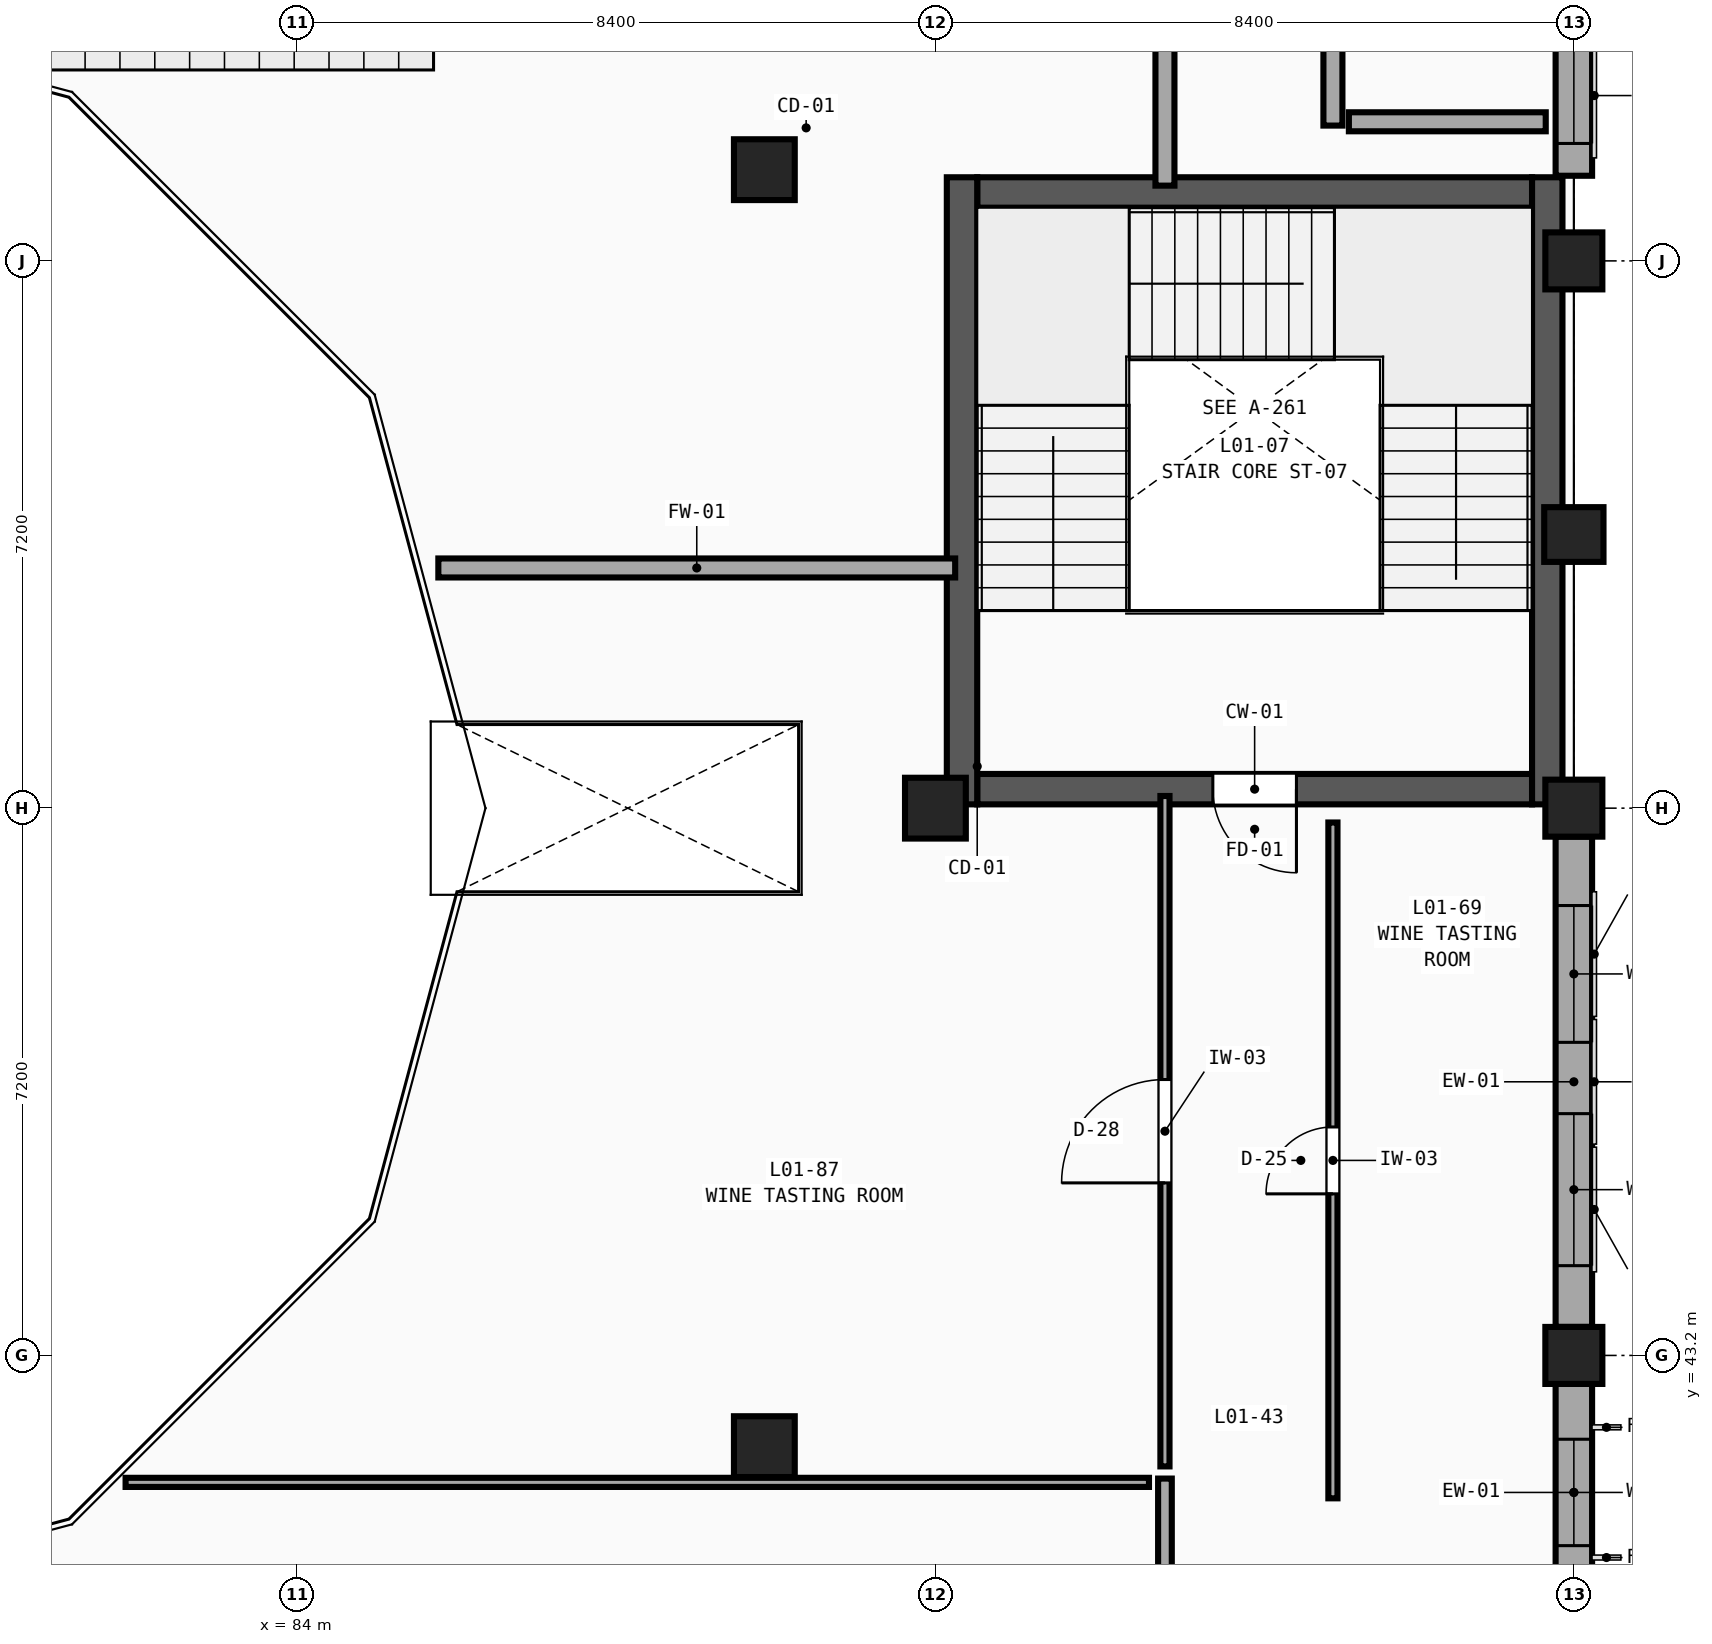
"""IFC4 building model, lengths in metres.
Left out: names, types, materials, properties, quantities, classifications, styles, units other than length and angle.
Written with IfcOpenShell. Run it as: python <this file> out.ifc"""

import sys

from ifc_helpers import new_model, si_unit, direction, frame, frame_2d, origin, origin_2d, place, context, subcontext, project, spatial, rectangle, circle, extrude, element, fill, save


model = new_model("IFC4")
c1 = context("Model", 3, precision=1e-05, world=origin(), true_north=direction((0.0, 1.0)))
c2 = subcontext(c1, "Body", "Model", "MODEL_VIEW")
j1 = project(units=[si_unit("LENGTHUNIT", "METRE"), si_unit("PLANEANGLEUNIT", "RADIAN")], contexts=[c1])
p1 = place(None, origin())
s1 = spatial("IfcSite", under=j1, at=p1, CompositionType="ELEMENT")
p2 = place(p1, origin())
s2 = spatial("IfcBuilding", under=s1, at=p2, CompositionType="ELEMENT")
p3 = place(p2, frame((0.0, 0.0, 5.4)))
s3 = spatial("IfcBuildingStorey", under=s2, at=p3, CompositionType="ELEMENT", Elevation=5.4)
for number, where, z_axis, x_axis in (
    (1, (100.8, 43.2, 0.0), (0.0, 0.0, 1.0), (1.0, 0.0, 0.0)),
    (2, (100.8, 50.4, 0.0), (0.0, 0.0, 1.0), (1.0, 0.0, 0.0)),
    (3, (100.8, 57.6, 0.0), (0.0, 0.0, 1.0), (1.0, 0.0, 0.0)),
):
    element("IfcColumn", number, at=place(p3, frame(where, z_axis=z_axis, x_axis=x_axis)), inside=s3, PredefinedType="COLUMN", context=c2, shape_type="SweptSolid", body=[
        extrude(rectangle(XDim=0.75, YDim=0.75, at=origin_2d()), origin(), (0.0, 0.0, 1.0), 4.5),
    ])
p4 = place(p3, frame((100.8, 54.0, 0.0), z_axis=(0.0, 0.0, 1.0), x_axis=(1.0, 0.0, 0.0)))
e4 = element("IfcColumn", 4, at=p4, inside=s3, PredefinedType="PILASTER", context=c2, shape_type="SweptSolid", body=[
    extrude(rectangle(XDim=0.78, YDim=0.72, at=origin_2d()), origin(), (0.0, 0.0, 1.0), 4.5),
])
for number, where, z_axis, x_axis in (
    (5, (92.4, 50.4, 0.0), (0.0, 0.0, 1.0), (1.0, 0.0, 0.0)),
    (6, (90.149, 58.8, 0.0), (0.0, 0.0, 1.0), (1.0, 0.0, 0.0)),
    (7, (90.149, 42.0, 0.0), (0.0, 0.0, 1.0), (1.0, 0.0, 0.0)),
):
    element("IfcColumn", number, at=place(p3, frame(where, z_axis=z_axis, x_axis=x_axis)), inside=s3, PredefinedType="COLUMN", context=c2, shape_type="SweptSolid", body=[
        extrude(circle(Radius=0.4, at=origin_2d()), origin(), (0.0, 0.0, 1.0), 4.5),
    ])
p5 = place(p3, frame((100.8, 42.825, 0.0), z_axis=(0.0, 0.0, 1.0), x_axis=(0.0, -1.0, 0.0)))
e8 = element("IfcWall", 8, at=p5, inside=s3, PredefinedType="SOLIDWALL", context=c2, shape_type="SweptSolid", body=[
    extrude(rectangle(XDim=2.855, YDim=0.48, at=frame_2d((1.427, 0.0))), origin(), (0.0, 0.0, 1.0), 3.63),
])
p6 = place(p5, frame((0.728, 0.0, 0.75)))
e9 = element("IfcOpeningElement", 9, at=p6, cuts=e8, PredefinedType="OPENING", context=c2, shape_type="SweptSolid", body=[
    extrude(rectangle(XDim=1.4, YDim=2.73, at=frame_2d((0.7, 1.365))), frame((0.0, 0.26, 0.0), z_axis=(0.0, -1.0, 0.0), x_axis=(1.0, 0.0, 0.0)), (0.0, 0.0, 1.0), 0.52),
])
p7 = place(p3, frame((100.8, 50.025, 0.0), z_axis=(0.0, 0.0, 1.0), x_axis=(0.0, -1.0, 0.0)))
e10 = element("IfcWall", 10, at=p7, inside=s3, PredefinedType="SOLIDWALL", context=c2, shape_type="SweptSolid", body=[
    extrude(rectangle(XDim=6.45, YDim=0.48, at=frame_2d((3.225, 0.0))), origin(), (0.0, 0.0, 1.0), 3.63),
])
p8 = place(p7, frame((0.906, 0.0, 0.75)))
e11 = element("IfcOpeningElement", 11, at=p8, cuts=e10, PredefinedType="OPENING", context=c2, shape_type="SweptSolid", body=[
    extrude(rectangle(XDim=1.8, YDim=2.73, at=frame_2d((0.9, 1.365))), frame((0.0, 0.26, 0.0), z_axis=(0.0, -1.0, 0.0), x_axis=(1.0, 0.0, 0.0)), (0.0, 0.0, 1.0), 0.52),
])
p9 = place(p7, frame((3.644, 0.0, 0.75)))
e12 = element("IfcOpeningElement", 12, at=p9, cuts=e10, PredefinedType="OPENING", context=c2, shape_type="SweptSolid", body=[
    extrude(rectangle(XDim=2.0, YDim=2.73, at=frame_2d((1.0, 1.365))), frame((0.0, 0.26, 0.0), z_axis=(0.0, -1.0, 0.0), x_axis=(1.0, 0.0, 0.0)), (0.0, 0.0, 1.0), 0.52),
])
p10 = place(p3, frame((100.8, 60.83, 0.0), z_axis=(0.0, 0.0, 1.0), x_axis=(0.0, -1.0, 0.0)))
e13 = element("IfcWall", 13, at=p10, inside=s3, PredefinedType="SOLIDWALL", context=c2, shape_type="SweptSolid", body=[
    extrude(rectangle(XDim=2.11, YDim=0.48, at=frame_2d((1.055, 0.0))), origin(), (0.0, 0.0, 1.0), 3.63),
])
p11 = place(p10, frame((0.425, 0.0, 0.75)))
e14 = element("IfcOpeningElement", 14, at=p11, cuts=e13, PredefinedType="OPENING", context=c2, shape_type="SweptSolid", body=[
    extrude(rectangle(XDim=1.26, YDim=2.73, at=frame_2d((0.63, 1.365))), frame((0.0, 0.26, 0.0), z_axis=(0.0, -1.0, 0.0), x_axis=(1.0, 0.0, 0.0)), (0.0, 0.0, 1.0), 0.52),
])
p12 = place(p3, frame((100.25, 50.65, 0.0), z_axis=(0.0, 0.0, 1.0), x_axis=(-1.0, 0.0, 0.0)))
e15 = element("IfcWall", 15, at=p12, inside=s3, PredefinedType="SHEAR", context=c2, shape_type="SweptSolid", body=[
    extrude(rectangle(XDim=7.3, YDim=0.4, at=frame_2d((3.65, 0.0))), origin(), (0.0, 0.0, 1.0), 4.5),
])
p13 = place(p12, frame((3.1, 0.0, 0.0)))
e16 = element("IfcOpeningElement", 16, at=p13, cuts=e15, PredefinedType="OPENING", context=c2, shape_type="SweptSolid", body=[
    extrude(rectangle(XDim=1.1, YDim=2.2, at=frame_2d((0.55, 1.1))), frame((0.0, 0.22, 0.0), z_axis=(0.0, -1.0, 0.0), x_axis=(1.0, 0.0, 0.0)), (0.0, 0.0, 1.0), 0.44),
])
p14 = place(p3, frame((92.95, 58.5, 0.0), z_axis=(0.0, 0.0, 1.0), x_axis=(1.0, 0.0, 0.0)))
e17 = element("IfcWall", 17, at=p14, inside=s3, PredefinedType="SHEAR", context=c2, shape_type="SweptSolid", body=[
    extrude(rectangle(XDim=7.3, YDim=0.4, at=frame_2d((3.65, 0.0))), origin(), (0.0, 0.0, 1.0), 4.5),
])
for number, where, z_axis, x_axis in (
    (18, (92.75, 58.7, 0.0), (0.0, 0.0, 1.0), (0.0, -1.0, 0.0)),
    (19, (100.45, 50.45, 0.0), (0.0, 0.0, 1.0), (0.0, 1.0, 0.0)),
):
    element("IfcWall", number, at=place(p3, frame(where, z_axis=z_axis, x_axis=x_axis)), inside=s3, PredefinedType="SHEAR", context=c2, shape_type="SweptSolid", body=[
        extrude(rectangle(XDim=8.25, YDim=0.4, at=frame_2d((4.125, 0.0))), origin(), (0.0, 0.0, 1.0), 4.5),
    ])
p15 = place(p3, frame((95.42, 58.59, 0.0), z_axis=(0.0, 0.0, 1.0), x_axis=(0.0, 1.0, 0.0)))
e20 = element("IfcWall", 20, at=p15, inside=s3, PredefinedType="SOLIDWALL", context=c2, shape_type="SweptSolid", body=[
    extrude(rectangle(XDim=9.63, YDim=0.25, at=frame_2d((4.815, 0.0))), origin(), (0.0, 0.0, 1.0), 4.18),
])
p16 = place(p15, frame((3.915, 0.0, 0.0)))
e21 = element("IfcOpeningElement", 21, at=p16, cuts=e20, PredefinedType="OPENING", context=c2, shape_type="SweptSolid", body=[
    extrude(rectangle(XDim=1.8, YDim=2.3, at=frame_2d((0.9, 1.15))), frame((0.0, 0.145, 0.0), z_axis=(0.0, -1.0, 0.0), x_axis=(1.0, 0.0, 0.0)), (0.0, 0.0, 1.0), 0.29),
])
p17 = place(p3, frame((97.63, 41.32, 0.0), z_axis=(0.0, 0.0, 1.0), x_axis=(0.0, 1.0, 0.0)))
e22 = element("IfcWall", 22, at=p17, inside=s3, PredefinedType="PARTITIONING", context=c2, shape_type="SweptSolid", body=[
    extrude(rectangle(XDim=8.891, YDim=0.12, at=frame_2d((4.446, 0.0))), origin(), (0.0, 0.0, 1.0), 4.18),
])
p18 = place(p17, frame((4.006, 0.0, 0.0)))
e23 = element("IfcOpeningElement", 23, at=p18, cuts=e22, PredefinedType="OPENING", context=c2, shape_type="SweptSolid", body=[
    extrude(rectangle(XDim=0.88, YDim=2.37, at=frame_2d((0.44, 1.185))), frame((0.0, 0.08, 0.0), z_axis=(0.0, -1.0, 0.0), x_axis=(1.0, 0.0, 0.0)), (0.0, 0.0, 1.0), 0.16),
])
p19 = place(p3, frame((97.63, 59.38, 0.0), z_axis=(0.0, 0.0, 1.0), x_axis=(0.0, 1.0, 0.0)))
e24 = element("IfcWall", 24, at=p19, inside=s3, PredefinedType="SOLIDWALL", context=c2, shape_type="SweptSolid", body=[
    extrude(rectangle(XDim=8.84, YDim=0.25, at=frame_2d((4.42, 0.0))), origin(), (0.0, 0.0, 1.0), 4.18),
])
p20 = place(p19, frame((3.52, 0.0, 0.0)))
e25 = element("IfcOpeningElement", 25, at=p20, cuts=e24, PredefinedType="OPENING", context=c2, shape_type="SweptSolid", body=[
    extrude(rectangle(XDim=1.8, YDim=2.3, at=frame_2d((0.9, 1.15))), frame((0.0, 0.145, 0.0), z_axis=(0.0, -1.0, 0.0), x_axis=(1.0, 0.0, 0.0)), (0.0, 0.0, 1.0), 0.29),
])
p21 = place(p3, frame((95.42, 41.74, 0.0), z_axis=(0.0, 0.0, 1.0), x_axis=(0.0, 1.0, 0.0)))
e26 = element("IfcWall", 26, at=p21, inside=s3, PredefinedType="PARTITIONING", context=c2, shape_type="SweptSolid", body=[
    extrude(rectangle(XDim=8.82, YDim=0.12, at=frame_2d((4.41, 0.0))), origin(), (0.0, 0.0, 1.0), 4.18),
])
p22 = place(p21, frame((3.73, 0.0, 0.0)))
e27 = element("IfcOpeningElement", 27, at=p22, cuts=e26, PredefinedType="OPENING", context=c2, shape_type="SweptSolid", body=[
    extrude(rectangle(XDim=1.36, YDim=2.37, at=frame_2d((0.68, 1.185))), frame((0.0, 0.08, 0.0), z_axis=(0.0, -1.0, 0.0), x_axis=(1.0, 0.0, 0.0)), (0.0, 0.0, 1.0), 0.16),
])
p23 = place(p3, frame((95.42, 36.37, 0.0), z_axis=(0.0, 0.0, 1.0), x_axis=(0.0, 1.0, 0.0)))
e28 = element("IfcWall", 28, at=p23, inside=s3, PredefinedType="PARTITIONING", context=c2, shape_type="SweptSolid", body=[
    extrude(rectangle(XDim=5.21, YDim=0.18, at=frame_2d((2.605, 0.0))), origin(), (0.0, 0.0, 1.0), 4.18),
])
p24 = place(p23, frame((1.845, 0.0, 0.0)))
e29 = element("IfcOpeningElement", 29, at=p24, cuts=e28, PredefinedType="OPENING", context=c2, shape_type="SweptSolid", body=[
    extrude(rectangle(XDim=1.52, YDim=2.05, at=frame_2d((0.76, 1.025))), frame((0.0, 0.11, 0.0), z_axis=(0.0, -1.0, 0.0), x_axis=(1.0, 0.0, 0.0)), (0.0, 0.0, 1.0), 0.22),
])
p25 = place(p3, frame((81.745, 41.53, 0.0), z_axis=(0.0, 0.0, 1.0), x_axis=(1.0, 0.0, 0.0)))
e30 = element("IfcWall", 30, at=p25, inside=s3, PredefinedType="PARTITIONING", context=c2, shape_type="SweptSolid", body=[
    extrude(rectangle(XDim=13.465, YDim=0.12, at=frame_2d((6.732, 0.0))), origin(), (0.0, 0.0, 1.0), 4.18),
])
p26 = place(p3, frame((85.86, 53.56, 0.0), z_axis=(0.0, 0.0, 1.0), x_axis=(1.0, 0.0, 0.0)))
e31 = element("IfcWall", 31, at=p26, inside=s3, PredefinedType="SOLIDWALL", context=c2, shape_type="SweptSolid", body=[
    extrude(rectangle(XDim=6.8, YDim=0.25, at=frame_2d((3.4, 0.0))), origin(), (0.0, 0.0, 1.0), 4.18),
])
p27 = place(p3, frame((97.84, 59.43, 0.0), z_axis=(0.0, 0.0, 1.0), x_axis=(1.0, 0.0, 0.0)))
e32 = element("IfcWall", 32, at=p27, inside=s3, PredefinedType="SOLIDWALL", context=c2, shape_type="SweptSolid", body=[
    extrude(rectangle(XDim=2.59, YDim=0.25, at=frame_2d((1.295, 0.0))), origin(), (0.0, 0.0, 1.0), 4.18),
])
p28 = place(p6, origin())
e33 = element("IfcWindow", 33, at=p28, inside=s3, PartitioningType="DOUBLE_PANEL_VERTICAL", PredefinedType="WINDOW", context=c2, shape_type="SweptSolid", body=[
    extrude(rectangle(XDim=1.4, YDim=2.73, at=frame_2d((0.7, 1.365))), frame((0.0, 0.03, 0.0), z_axis=(0.0, -1.0, 0.0), x_axis=(1.0, 0.0, 0.0)), (0.0, 0.0, 1.0), 0.06),
])
fill(e9, e33)
p29 = place(p8, origin())
e34 = element("IfcWindow", 34, at=p29, inside=s3, PartitioningType="DOUBLE_PANEL_VERTICAL", PredefinedType="WINDOW", context=c2, shape_type="SweptSolid", body=[
    extrude(rectangle(XDim=1.8, YDim=2.73, at=frame_2d((0.9, 1.365))), frame((0.0, 0.03, 0.0), z_axis=(0.0, -1.0, 0.0), x_axis=(1.0, 0.0, 0.0)), (0.0, 0.0, 1.0), 0.06),
])
fill(e11, e34)
p30 = place(p9, origin())
e35 = element("IfcWindow", 35, at=p30, inside=s3, PartitioningType="TRIPLE_PANEL_VERTICAL", PredefinedType="WINDOW", context=c2, shape_type="SweptSolid", body=[
    extrude(rectangle(XDim=2.0, YDim=2.73, at=frame_2d((1.0, 1.365))), frame((0.0, 0.03, 0.0), z_axis=(0.0, -1.0, 0.0), x_axis=(1.0, 0.0, 0.0)), (0.0, 0.0, 1.0), 0.06),
])
fill(e12, e35)
p31 = place(p11, origin())
e36 = element("IfcWindow", 36, at=p31, inside=s3, PartitioningType="TRIPLE_PANEL_VERTICAL", PredefinedType="WINDOW", context=c2, shape_type="SweptSolid", body=[
    extrude(rectangle(XDim=1.26, YDim=2.73, at=frame_2d((0.63, 1.365))), frame((0.0, 0.03, 0.0), z_axis=(0.0, -1.0, 0.0), x_axis=(1.0, 0.0, 0.0)), (0.0, 0.0, 1.0), 0.06),
])
fill(e14, e36)
p32 = place(p13, origin())
e37 = element("IfcDoor", 37, at=p32, inside=s3, OperationType="SINGLE_SWING_LEFT", PredefinedType="DOOR", context=c2, shape_type="SweptSolid", body=[
    extrude(rectangle(XDim=1.1, YDim=2.2, at=frame_2d((0.55, 1.1))), frame((0.0, 0.025, 0.0), z_axis=(0.0, -1.0, 0.0), x_axis=(1.0, 0.0, 0.0)), (0.0, 0.0, 1.0), 0.05),
])
fill(e16, e37)
p33 = place(p18, origin())
e38 = element("IfcDoor", 38, at=p33, inside=s3, OperationType="SINGLE_SWING_LEFT", PredefinedType="DOOR", context=c2, shape_type="SweptSolid", body=[
    extrude(rectangle(XDim=0.88, YDim=2.37, at=frame_2d((0.44, 1.185))), frame((0.0, 0.025, 0.0), z_axis=(0.0, -1.0, 0.0), x_axis=(1.0, 0.0, 0.0)), (0.0, 0.0, 1.0), 0.05),
])
fill(e23, e38)
p34 = place(p22, origin())
e39 = element("IfcDoor", 39, at=p34, inside=s3, OperationType="SINGLE_SWING_LEFT", PredefinedType="DOOR", context=c2, shape_type="SweptSolid", body=[
    extrude(rectangle(XDim=1.36, YDim=2.37, at=frame_2d((0.68, 1.185))), frame((0.0, 0.025, 0.0), z_axis=(0.0, -1.0, 0.0), x_axis=(1.0, 0.0, 0.0)), (0.0, 0.0, 1.0), 0.05),
])
fill(e27, e39)
save(model, sys.argv[1])
